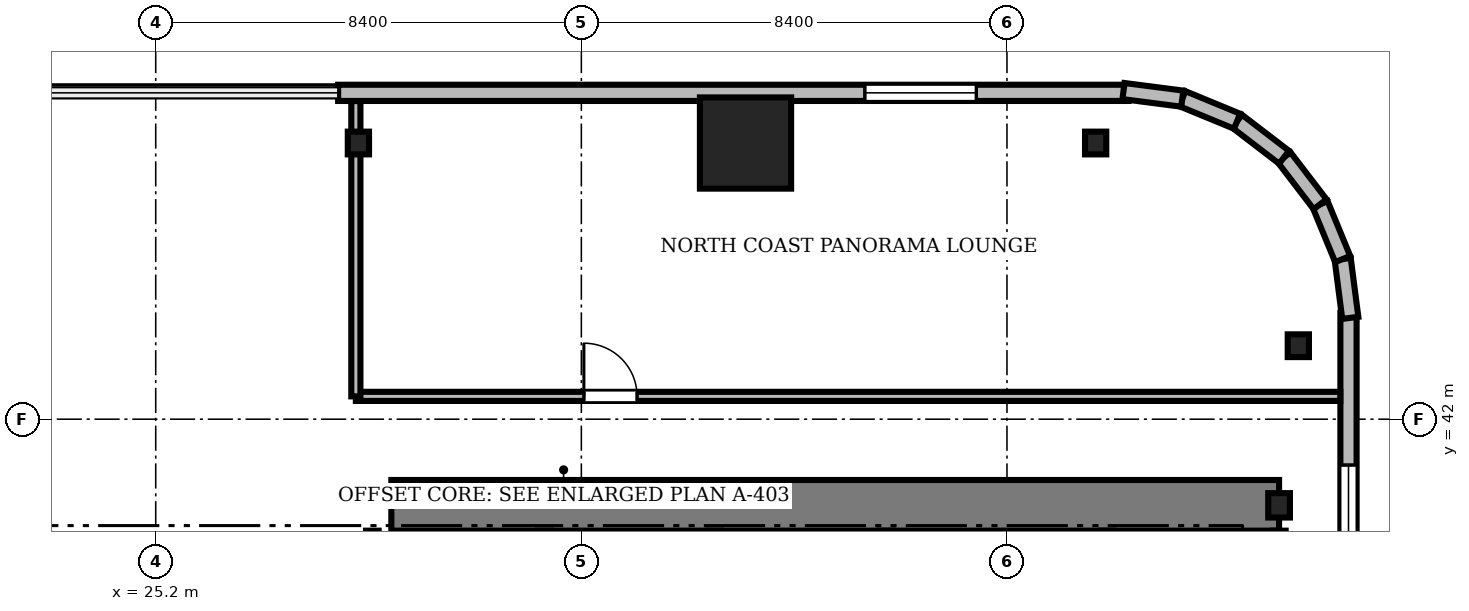
"""IFC4 building model, lengths in metres.
Left out: names, types, materials, properties, quantities, classifications, styles, units other than length and angle.
Written with IfcOpenShell. Run it as: python <this file> out.ifc"""

import sys

from ifc_helpers import new_model, si_unit, direction, frame, frame_2d, origin, origin_2d, place, context, subcontext, project, spatial, rectangle, i_section, extrude, source, transform, mapped, element, fill, save


model = new_model("IFC4")
c1 = context("Model", 3, precision=1e-05, world=origin(), true_north=direction((0.0, 1.0)))
c2 = subcontext(c1, "Body", "Model", "MODEL_VIEW")
j1 = project(units=[si_unit("LENGTHUNIT", "METRE"), si_unit("PLANEANGLEUNIT", "RADIAN")], contexts=[c1])
p1 = place(None, origin())
s1 = spatial("IfcSite", under=j1, at=p1, CompositionType="ELEMENT")
p2 = place(p1, origin())
s2 = spatial("IfcBuilding", under=s1, at=p2, CompositionType="ELEMENT")
p3 = place(p2, frame((0.0, 0.0, 89.65)))
s3 = spatial("IfcBuildingStorey", under=s2, at=p3, CompositionType="ELEMENT", Elevation=89.65)
m1 = source(origin(), c2, "Body", "SweptSolid", [
    extrude(rectangle(XDim=17.52, YDim=1.0, at=frame_2d((8.76, 0.0))), origin(), (0.0, 0.0, 1.0), 3.0),
])
p4 = place(p3, frame((29.85, 40.3, 0.0), z_axis=(0.0, 0.0, 1.0), x_axis=(1.0, 0.0, 0.0)))
e1 = element("IfcWall", 1, at=p4, inside=s3, PredefinedType="SHEAR", context=c2, shape_type="MappedRepresentation", body=[
    mapped(m1, transform((0.0, 0.0, 0.0), scale=1.0)),
])
m2 = source(origin(), c2, "Body", "SweptSolid", [
    extrude(i_section(OverallWidth=0.428, OverallDepth=0.481, WebThickness=0.04, FlangeThickness=0.063, FilletRadius=0.015, at=origin_2d()), origin(), (0.0, 0.0, 1.0), 3.0),
])
p5 = place(p3, frame((47.37, 40.3, 0.0), z_axis=(0.0, 0.0, 1.0), x_axis=(1.0, 0.0, 0.0)))
e2 = element("IfcColumn", 2, at=p5, inside=s3, PredefinedType="COLUMN", context=c2, shape_type="MappedRepresentation", body=[
    mapped(m2, transform((0.0, 0.0, 0.0), scale=1.0)),
])
m3 = source(origin(), c2, "Body", "SweptSolid", [
    extrude(rectangle(XDim=1.8, YDim=1.8, at=origin_2d()), origin(), (0.0, 0.0, 1.0), 3.0),
])
p6 = place(p3, frame((36.84, 47.45, 0.0), z_axis=(0.0, 0.0, 1.0), x_axis=(1.0, 0.0, 0.0)))
e3 = element("IfcColumn", 3, at=p6, inside=s3, PredefinedType="COLUMN", context=c2, shape_type="MappedRepresentation", body=[
    mapped(m3, transform((0.0, 0.0, 0.0), scale=1.0)),
])
m4 = source(origin(), c2, "Body", "SweptSolid", [
    extrude(i_section(OverallWidth=0.419, OverallDepth=0.449, WebThickness=0.031, FlangeThickness=0.048, FilletRadius=0.015, at=origin_2d()), origin(), (0.0, 0.0, 1.0), 3.0),
])
for number, where, z_axis, x_axis in (
    (4, (47.75, 43.45, 0.0), (0.0, 0.0, 1.0), (1.0, 0.0, 0.0)),
    (5, (43.75, 47.45, 0.0), (0.0, 0.0, 1.0), (1.0, 0.0, 0.0)),
    (6, (29.2, 47.45, 0.0), (0.0, 0.0, 1.0), (1.0, 0.0, 0.0)),
):
    element("IfcColumn", number, at=place(p3, frame(where, z_axis=z_axis, x_axis=x_axis)), inside=s3, PredefinedType="COLUMN", context=c2, shape_type="MappedRepresentation", body=[
        mapped(m4, transform((0.0, 0.0, 0.0), scale=1.0)),
    ])
m5 = source(origin(), c2, "Body", "SweptSolid", [
    extrude(rectangle(XDim=15.6, YDim=0.32, at=frame_2d((7.8, 0.0))), origin(), (0.0, 0.0, 1.0), 3.0),
])
p7 = place(p3, frame((44.4, 48.44, 0.0), z_axis=(0.0, 0.0, 1.0), x_axis=(-1.0, 0.0, 0.0)))
e7 = element("IfcWall", 7, at=p7, inside=s3, PredefinedType="SOLIDWALL", context=c2, shape_type="MappedRepresentation", body=[
    mapped(m5, transform((0.0, 0.0, 0.0), scale=1.0)),
])
m6 = source(origin(), c2, "Body", "SweptSolid", [
    extrude(rectangle(XDim=2.2, YDim=2.4, at=frame_2d((1.1, 1.2))), frame((0.0, 0.17, 0.0), z_axis=(0.0, -1.0, 0.0), x_axis=(1.0, 0.0, 0.0)), (0.0, 0.0, 1.0), 0.34),
])
p8 = place(p7, frame((3.005, 0.0, 0.35)))
e8 = element("IfcOpeningElement", 8, at=p8, cuts=e7, PredefinedType="OPENING", context=c2, shape_type="MappedRepresentation", body=[
    mapped(m6, transform((0.0, 0.0, 0.0), scale=1.0)),
])
m7 = source(origin(), c2, "Body", "SweptSolid", [
    extrude(rectangle(XDim=15.6, YDim=0.32, at=frame_2d((7.8, 0.0))), origin(), (0.0, 0.0, 1.0), 3.0),
])
p9 = place(p3, frame((48.74, 28.5, 0.0), z_axis=(0.0, 0.0, 1.0), x_axis=(0.0, 1.0, 0.0)))
e9 = element("IfcWall", 9, at=p9, inside=s3, PredefinedType="SOLIDWALL", context=c2, shape_type="MappedRepresentation", body=[
    mapped(m7, transform((0.0, 0.0, 0.0), scale=1.0)),
])
p10 = place(p9, frame((10.395, 0.0, 0.35)))
e10 = element("IfcOpeningElement", 10, at=p10, cuts=e9, PredefinedType="OPENING", context=c2, shape_type="MappedRepresentation", body=[
    mapped(m6, transform((0.0, 0.0, 0.0), scale=1.0)),
])
m8 = source(origin(), c2, "Body", "SweptSolid", [
    extrude(rectangle(XDim=1.17, YDim=0.32, at=frame_2d((0.585, 0.0))), origin(), (0.0, 0.0, 1.0), 3.0),
])
p11 = place(p3, frame((48.776, 44.0, 0.0), z_axis=(0.0, 0.0, 1.0), x_axis=(-0.128295670475, 0.991735963317, 0.0)))
e11 = element("IfcWall", 11, at=p11, inside=s3, PredefinedType="SOLIDWALL", context=c2, shape_type="MappedRepresentation", body=[
    mapped(m8, transform((0.0, 0.0, 0.0), scale=1.0)),
])
m9 = source(origin(), c2, "Body", "SweptSolid", [
    extrude(rectangle(XDim=1.169, YDim=0.32, at=frame_2d((0.584, 0.0))), origin(), (0.0, 0.0, 1.0), 3.0),
])
p12 = place(p3, frame((48.625, 45.16, 0.0), z_axis=(0.0, 0.0, 1.0), x_axis=(-0.381054331552, 0.924552646638, 0.0)))
e12 = element("IfcWall", 12, at=p12, inside=s3, PredefinedType="SOLIDWALL", context=c2, shape_type="MappedRepresentation", body=[
    mapped(m9, transform((0.0, 0.0, 0.0), scale=1.0)),
])
m10 = source(origin(), c2, "Body", "SweptSolid", [
    extrude(rectangle(XDim=1.169, YDim=0.32, at=frame_2d((0.584, 0.0))), origin(), (0.0, 0.0, 1.0), 3.0),
])
p13 = place(p3, frame((48.18, 46.241, 0.0), z_axis=(0.0, 0.0, 1.0), x_axis=(-0.608387696831, 0.793639975269, 0.0)))
e13 = element("IfcWall", 13, at=p13, inside=s3, PredefinedType="SOLIDWALL", context=c2, shape_type="MappedRepresentation", body=[
    mapped(m10, transform((0.0, 0.0, 0.0), scale=1.0)),
])
m11 = source(origin(), c2, "Body", "SweptSolid", [
    extrude(rectangle(XDim=1.169, YDim=0.32, at=frame_2d((0.584, 0.0))), origin(), (0.0, 0.0, 1.0), 3.0),
])
p14 = place(p3, frame((47.469, 47.169, 0.0), z_axis=(0.0, 0.0, 1.0), x_axis=(-0.793663520347, 0.608356981114, 0.0)))
e14 = element("IfcWall", 14, at=p14, inside=s3, PredefinedType="SOLIDWALL", context=c2, shape_type="MappedRepresentation", body=[
    mapped(m11, transform((0.0, 0.0, 0.0), scale=1.0)),
])
p15 = place(p3, frame((46.541, 47.88, 0.0), z_axis=(0.0, 0.0, 1.0), x_axis=(-0.924552646638, 0.381054331552, 0.0)))
e15 = element("IfcWall", 15, at=p15, inside=s3, PredefinedType="SOLIDWALL", context=c2, shape_type="MappedRepresentation", body=[
    mapped(m9, transform((0.0, 0.0, 0.0), scale=1.0)),
])
p16 = place(p3, frame((45.46, 48.325, 0.0), z_axis=(0.0, 0.0, 1.0), x_axis=(-0.991735963317, 0.128295670475, 0.0)))
e16 = element("IfcWall", 16, at=p16, inside=s3, PredefinedType="SOLIDWALL", context=c2, shape_type="MappedRepresentation", body=[
    mapped(m8, transform((0.0, 0.0, 0.0), scale=1.0)),
])
m12 = source(origin(), c2, "Body", "SweptSolid", [
    extrude(rectangle(XDim=9.15, YDim=0.25, at=frame_2d((4.575, 0.0))), origin(), (0.0, 0.0, 1.0), 3.45),
])
for number, where, z_axis, x_axis in (
    (17, (29.475, 30.65, 0.0), (0.0, 0.0, 1.0), (0.0, 1.0, 0.0)),
    (18, (32.875, 30.65, 0.0), (0.0, 0.0, 1.0), (0.0, 1.0, 0.0)),
    (19, (36.225, 30.65, 0.0), (0.0, 0.0, 1.0), (0.0, 1.0, 0.0)),
    (20, (39.625, 30.65, 0.0), (0.0, 0.0, 1.0), (0.0, 1.0, 0.0)),
    (21, (43.975, 30.65, 0.0), (0.0, 0.0, 1.0), (0.0, 1.0, 0.0)),
    (22, (47.375, 30.65, 0.0), (0.0, 0.0, 1.0), (0.0, 1.0, 0.0)),
):
    element("IfcWall", number, at=place(p3, frame(where, z_axis=z_axis, x_axis=x_axis)), inside=s3, PredefinedType="SOLIDWALL", context=c2, shape_type="MappedRepresentation", body=[
        mapped(m12, transform((0.0, 0.0, 0.0), scale=1.0)),
    ])
m13 = source(origin(), c2, "Body", "SweptSolid", [
    extrude(rectangle(XDim=19.428, YDim=0.18, at=frame_2d((9.714, 0.0))), origin(), (0.0, 0.0, 1.0), 2.276),
])
p17 = place(p3, frame((29.15, 42.45, 0.0), z_axis=(0.0, 0.0, 1.0), x_axis=(1.0, 0.0, 0.0)))
e23 = element("IfcWall", 23, at=p17, inside=s3, PredefinedType="PARTITIONING", context=c2, shape_type="MappedRepresentation", body=[
    mapped(m13, transform((0.0, 0.0, 0.0), scale=1.0)),
])
m14 = source(origin(), c2, "Body", "SweptSolid", [
    extrude(rectangle(XDim=1.05, YDim=2.2, at=frame_2d((0.525, 1.1))), frame((0.0, 0.1, 0.0), z_axis=(0.0, -1.0, 0.0), x_axis=(1.0, 0.0, 0.0)), (0.0, 0.0, 1.0), 0.2),
])
p18 = place(p17, frame((4.5, 0.0, 0.0)))
e24 = element("IfcOpeningElement", 24, at=p18, cuts=e23, PredefinedType="OPENING", context=c2, shape_type="MappedRepresentation", body=[
    mapped(m14, transform((0.0, 0.0, 0.0), scale=1.0)),
])
m15 = source(origin(), c2, "Body", "SweptSolid", [
    extrude(rectangle(XDim=5.828, YDim=0.18, at=frame_2d((2.914, 0.0))), origin(), (0.0, 0.0, 1.0), 2.276),
])
p19 = place(p3, frame((29.15, 42.45, 0.0), z_axis=(0.0, 0.0, 1.0), x_axis=(0.0, 1.0, 0.0)))
e25 = element("IfcWall", 25, at=p19, inside=s3, PredefinedType="PARTITIONING", context=c2, shape_type="MappedRepresentation", body=[
    mapped(m15, transform((0.0, 0.0, 0.0), scale=1.0)),
])
m16 = source(origin(), c2, "Body", "SweptSolid", [
    extrude(rectangle(XDim=2.2, YDim=2.4, at=frame_2d((1.1, 1.2))), frame((0.0, 0.03, 0.0), z_axis=(0.0, -1.0, 0.0), x_axis=(1.0, 0.0, 0.0)), (0.0, 0.0, 1.0), 0.06),
])
p20 = place(p8, origin())
e26 = element("IfcWindow", 26, at=p20, inside=s3, PartitioningType="SINGLE_PANEL", PredefinedType="WINDOW", context=c2, shape_type="MappedRepresentation", body=[
    mapped(m16, transform((0.0, 0.0, 0.0), scale=1.0)),
])
fill(e8, e26)
p21 = place(p10, origin())
e27 = element("IfcWindow", 27, at=p21, inside=s3, PartitioningType="SINGLE_PANEL", PredefinedType="WINDOW", context=c2, shape_type="MappedRepresentation", body=[
    mapped(m16, transform((0.0, 0.0, 0.0), scale=1.0)),
])
fill(e10, e27)
m17 = source(origin(), c2, "Body", "SweptSolid", [
    extrude(rectangle(XDim=1.05, YDim=2.2, at=frame_2d((0.525, 1.1))), frame((0.0, 0.025, 0.0), z_axis=(0.0, -1.0, 0.0), x_axis=(1.0, 0.0, 0.0)), (0.0, 0.0, 1.0), 0.05),
])
p22 = place(p18, origin())
e28 = element("IfcDoor", 28, at=p22, inside=s3, OperationType="SINGLE_SWING_LEFT", PredefinedType="DOOR", context=c2, shape_type="MappedRepresentation", body=[
    mapped(m17, transform((0.0, 0.0, 0.0), scale=1.0)),
])
fill(e24, e28)
save(model, sys.argv[1])
